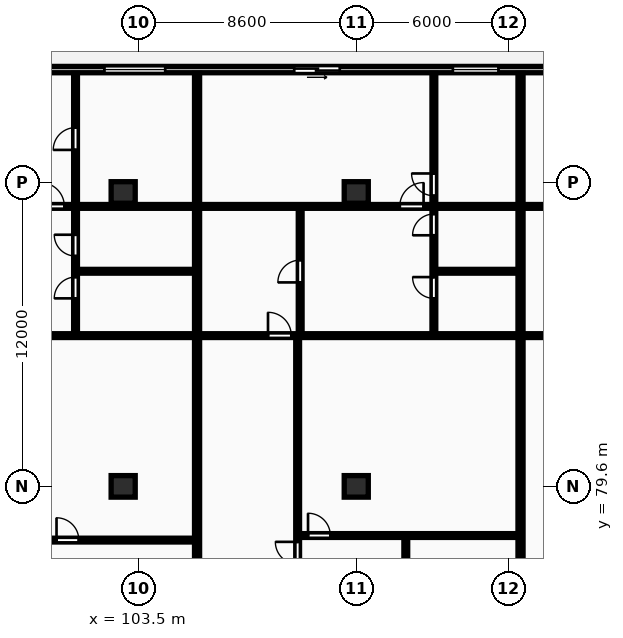
"""IFC4 building model, lengths in metres.
Left out: names, types, materials, properties, quantities, classifications, styles, units other than length and angle.
Written with IfcOpenShell. Run it as: python <this file> out.ifc"""

import sys

from ifc_helpers import new_model, si_unit, direction, frame, frame_2d, origin, origin_2d, place, context, subcontext, project, spatial, rectangle, extrude, element, fill, save


model = new_model("IFC4")
c1 = context("Model", 3, precision=1e-05, world=origin(), true_north=direction((0.0, 1.0)))
c2 = subcontext(c1, "Body", "Model", "MODEL_VIEW")
j1 = project(units=[si_unit("LENGTHUNIT", "METRE"), si_unit("PLANEANGLEUNIT", "RADIAN")], contexts=[c1])
p1 = place(None, origin())
s1 = spatial("IfcSite", under=j1, at=p1, CompositionType="ELEMENT")
p2 = place(p1, origin())
s2 = spatial("IfcBuilding", under=s1, at=p2, CompositionType="ELEMENT")
p3 = place(p2, frame((0.0, 0.0, 106.8)))
s3 = spatial("IfcBuildingStorey", under=s2, at=p3, CompositionType="ELEMENT", Elevation=106.8)
for number, where, z_axis, x_axis in (
    (1, (102.9, 79.6, 0.0), (0.0, 0.0, 1.0), (1.0, 0.0, 0.0)),
    (2, (102.9, 91.2, 0.0), (0.0, 0.0, 1.0), (1.0, 0.0, 0.0)),
    (3, (112.1, 79.6, 0.0), (0.0, 0.0, 1.0), (1.0, 0.0, 0.0)),
    (4, (112.1, 91.2, 0.0), (0.0, 0.0, 1.0), (1.0, 0.0, 0.0)),
):
    element("IfcColumn", number, at=place(p3, frame(where, z_axis=z_axis, x_axis=x_axis)), inside=s3, PredefinedType="COLUMN", context=c2, shape_type="SweptSolid", body=[
        extrude(rectangle(XDim=0.95, YDim=0.85, at=origin_2d()), origin(), (0.0, 0.0, 1.0), 3.25),
    ])
p4 = place(p3, frame((130.6, 96.05, 0.0), z_axis=(0.0, 0.0, 1.0), x_axis=(-1.0, 0.0, 0.0)))
e5 = element("IfcWall", 5, at=p4, inside=s3, PredefinedType="STANDARD", context=c2, shape_type="SweptSolid", body=[
    extrude(rectangle(XDim=73.0, YDim=0.25, at=frame_2d((36.5, 0.0))), origin(), (0.0, 0.0, 1.0), 2.97),
])
p5 = place(p4, frame((68.319, 0.0, 0.0)))
e6 = element("IfcOpeningElement", 6, at=p5, cuts=e5, PredefinedType="OPENING", context=c2, shape_type="SweptSolid", body=[
    extrude(rectangle(XDim=1.8, YDim=2.2, at=frame_2d((0.9, 1.1))), frame((0.0, 0.135, 0.0), z_axis=(0.0, -1.0, 0.0), x_axis=(1.0, 0.0, 0.0)), (0.0, 0.0, 1.0), 0.27),
])
p6 = place(p4, frame((59.277, 0.0, 0.85)))
e7 = element("IfcOpeningElement", 7, at=p6, cuts=e5, PredefinedType="OPENING", context=c2, shape_type="SweptSolid", body=[
    extrude(rectangle(XDim=2.4, YDim=1.9, at=frame_2d((1.2, 0.95))), frame((0.0, 0.135, 0.0), z_axis=(0.0, -1.0, 0.0), x_axis=(1.0, 0.0, 0.0)), (0.0, 0.0, 1.0), 0.27),
])
p7 = place(p4, frame((50.199, 0.0, 0.0)))
e8 = element("IfcOpeningElement", 8, at=p7, cuts=e5, PredefinedType="OPENING", context=c2, shape_type="SweptSolid", body=[
    extrude(rectangle(XDim=1.8, YDim=2.2, at=frame_2d((0.9, 1.1))), frame((0.0, 0.135, 0.0), z_axis=(0.0, -1.0, 0.0), x_axis=(1.0, 0.0, 0.0)), (0.0, 0.0, 1.0), 0.27),
])
p8 = place(p4, frame((40.481, 0.0, 0.85)))
e9 = element("IfcOpeningElement", 9, at=p8, cuts=e5, PredefinedType="OPENING", context=c2, shape_type="SweptSolid", body=[
    extrude(rectangle(XDim=2.4, YDim=1.9, at=frame_2d((1.2, 0.95))), frame((0.0, 0.135, 0.0), z_axis=(0.0, -1.0, 0.0), x_axis=(1.0, 0.0, 0.0)), (0.0, 0.0, 1.0), 0.27),
])
p9 = place(p4, frame((31.93, 0.0, 0.0)))
e10 = element("IfcOpeningElement", 10, at=p9, cuts=e5, PredefinedType="OPENING", context=c2, shape_type="SweptSolid", body=[
    extrude(rectangle(XDim=1.8, YDim=2.2, at=frame_2d((0.9, 1.1))), frame((0.0, 0.135, 0.0), z_axis=(0.0, -1.0, 0.0), x_axis=(1.0, 0.0, 0.0)), (0.0, 0.0, 1.0), 0.27),
])
p10 = place(p4, frame((26.042, 0.0, 0.85)))
e11 = element("IfcOpeningElement", 11, at=p10, cuts=e5, PredefinedType="OPENING", context=c2, shape_type="SweptSolid", body=[
    extrude(rectangle(XDim=2.4, YDim=1.9, at=frame_2d((1.2, 0.95))), frame((0.0, 0.135, 0.0), z_axis=(0.0, -1.0, 0.0), x_axis=(1.0, 0.0, 0.0)), (0.0, 0.0, 1.0), 0.27),
])
p11 = place(p4, frame((19.15, 0.0, 0.0)))
e12 = element("IfcOpeningElement", 12, at=p11, cuts=e5, PredefinedType="OPENING", context=c2, shape_type="SweptSolid", body=[
    extrude(rectangle(XDim=1.8, YDim=2.2, at=frame_2d((0.9, 1.1))), frame((0.0, 0.135, 0.0), z_axis=(0.0, -1.0, 0.0), x_axis=(1.0, 0.0, 0.0)), (0.0, 0.0, 1.0), 0.27),
])
p12 = place(p4, frame((12.886, 0.0, 0.85)))
e13 = element("IfcOpeningElement", 13, at=p12, cuts=e5, PredefinedType="OPENING", context=c2, shape_type="SweptSolid", body=[
    extrude(rectangle(XDim=1.8, YDim=1.8, at=frame_2d((0.9, 0.9))), frame((0.0, 0.135, 0.0), z_axis=(0.0, -1.0, 0.0), x_axis=(1.0, 0.0, 0.0)), (0.0, 0.0, 1.0), 0.27),
])
p13 = place(p4, frame((7.088, 0.0, 0.0)))
e14 = element("IfcOpeningElement", 14, at=p13, cuts=e5, PredefinedType="OPENING", context=c2, shape_type="SweptSolid", body=[
    extrude(rectangle(XDim=1.8, YDim=2.2, at=frame_2d((0.9, 1.1))), frame((0.0, 0.135, 0.0), z_axis=(0.0, -1.0, 0.0), x_axis=(1.0, 0.0, 0.0)), (0.0, 0.0, 1.0), 0.27),
])
p14 = place(p4, frame((0.9, 0.0, 0.85)))
e15 = element("IfcOpeningElement", 15, at=p14, cuts=e5, PredefinedType="OPENING", context=c2, shape_type="SweptSolid", body=[
    extrude(rectangle(XDim=2.4, YDim=1.9, at=frame_2d((1.2, 0.95))), frame((0.0, 0.135, 0.0), z_axis=(0.0, -1.0, 0.0), x_axis=(1.0, 0.0, 0.0)), (0.0, 0.0, 1.0), 0.27),
])
p15 = place(p3, frame((105.817, 69.83, 0.0), z_axis=(0.0, 0.0, 1.0), x_axis=(0.0, 1.0, 0.0)))
e16 = element("IfcWall", 16, at=p15, inside=s3, PredefinedType="PARTITIONING", context=c2, shape_type="SweptSolid", body=[
    extrude(rectangle(XDim=26.07, YDim=0.2, at=frame_2d((13.035, 0.0))), origin(), (0.0, 0.0, 1.0), 2.97),
])
p16 = place(p3, frame((98.431, 77.48, 0.0), z_axis=(0.0, 0.0, 1.0), x_axis=(1.0, 0.0, 0.0)))
e17 = element("IfcWall", 17, at=p16, inside=s3, PredefinedType="PARTITIONING", context=c2, shape_type="SweptSolid", body=[
    extrude(rectangle(XDim=7.306, YDim=0.15, at=frame_2d((3.653, 0.0))), origin(), (0.0, 0.0, 1.0), 2.97),
])
p17 = place(p16, frame((1.839, 0.0, 0.0)))
e18 = element("IfcOpeningElement", 18, at=p17, cuts=e17, PredefinedType="OPENING", context=c2, shape_type="SweptSolid", body=[
    extrude(rectangle(XDim=0.88, YDim=2.06, at=frame_2d((0.44, 1.03))), frame((0.0, 0.085, 0.0), z_axis=(0.0, -1.0, 0.0), x_axis=(1.0, 0.0, 0.0)), (0.0, 0.0, 1.0), 0.17),
])
p18 = place(p3, frame((101.08, 88.09, 0.0), z_axis=(0.0, 0.0, 1.0), x_axis=(1.0, 0.0, 0.0)))
e19 = element("IfcWall", 19, at=p18, inside=s3, PredefinedType="PARTITIONING", context=c2, shape_type="SweptSolid", body=[
    extrude(rectangle(XDim=4.656, YDim=0.15, at=frame_2d((2.328, 0.0))), origin(), (0.0, 0.0, 1.0), 2.97),
])
p19 = place(p3, frame((101.02, 85.59, 0.0), z_axis=(0.0, 0.0, 1.0), x_axis=(0.0, 1.0, 0.0)))
e20 = element("IfcWall", 20, at=p19, inside=s3, PredefinedType="PARTITIONING", context=c2, shape_type="SweptSolid", body=[
    extrude(rectangle(XDim=10.31, YDim=0.15, at=frame_2d((5.155, 0.0))), origin(), (0.0, 0.0, 1.0), 2.97),
])
p20 = place(p19, frame((1.43, 0.0, 0.0)))
e21 = element("IfcOpeningElement", 21, at=p20, cuts=e20, PredefinedType="OPENING", context=c2, shape_type="SweptSolid", body=[
    extrude(rectangle(XDim=0.84, YDim=2.04, at=frame_2d((0.42, 1.02))), frame((0.0, 0.085, 0.0), z_axis=(0.0, -1.0, 0.0), x_axis=(1.0, 0.0, 0.0)), (0.0, 0.0, 1.0), 0.17),
])
p21 = place(p19, frame((3.102, 0.0, 0.0)))
e22 = element("IfcOpeningElement", 22, at=p21, cuts=e20, PredefinedType="OPENING", context=c2, shape_type="SweptSolid", body=[
    extrude(rectangle(XDim=0.84, YDim=2.04, at=frame_2d((0.42, 1.02))), frame((0.0, 0.085, 0.0), z_axis=(0.0, -1.0, 0.0), x_axis=(1.0, 0.0, 0.0)), (0.0, 0.0, 1.0), 0.17),
])
p22 = place(p19, frame((7.29, 0.0, 0.0)))
e23 = element("IfcOpeningElement", 23, at=p22, cuts=e20, PredefinedType="OPENING", context=c2, shape_type="SweptSolid", body=[
    extrude(rectangle(XDim=0.88, YDim=2.06, at=frame_2d((0.44, 1.03))), frame((0.0, 0.085, 0.0), z_axis=(0.0, -1.0, 0.0), x_axis=(1.0, 0.0, 0.0)), (0.0, 0.0, 1.0), 0.17),
])
p23 = place(p3, frame((94.481, 85.55, 0.0), z_axis=(0.0, 0.0, 1.0), x_axis=(1.0, 0.0, 0.0)))
e24 = element("IfcWall", 24, at=p23, inside=s3, PredefinedType="PARTITIONING", context=c2, shape_type="SweptSolid", body=[
    extrude(rectangle(XDim=11.256, YDim=0.15, at=frame_2d((5.628, 0.0))), origin(), (0.0, 0.0, 1.0), 2.97),
])
p24 = place(p23, frame((2.72, 0.0, 0.0)))
e25 = element("IfcOpeningElement", 25, at=p24, cuts=e24, PredefinedType="OPENING", context=c2, shape_type="SweptSolid", body=[
    extrude(rectangle(XDim=0.92, YDim=2.08, at=frame_2d((0.46, 1.04))), frame((0.0, 0.085, 0.0), z_axis=(0.0, -1.0, 0.0), x_axis=(1.0, 0.0, 0.0)), (0.0, 0.0, 1.0), 0.17),
])
p25 = place(p3, frame((94.481, 90.65, 0.0), z_axis=(0.0, 0.0, 1.0), x_axis=(1.0, 0.0, 0.0)))
e26 = element("IfcWall", 26, at=p25, inside=s3, PredefinedType="PARTITIONING", context=c2, shape_type="SweptSolid", body=[
    extrude(rectangle(XDim=11.256, YDim=0.15, at=frame_2d((5.628, 0.0))), origin(), (0.0, 0.0, 1.0), 2.97),
])
p26 = place(p25, frame((5.158, 0.0, 0.0)))
e27 = element("IfcOpeningElement", 27, at=p26, cuts=e26, PredefinedType="OPENING", context=c2, shape_type="SweptSolid", body=[
    extrude(rectangle(XDim=0.94, YDim=2.1, at=frame_2d((0.47, 1.05))), frame((0.0, 0.085, 0.0), z_axis=(0.0, -1.0, 0.0), x_axis=(1.0, 0.0, 0.0)), (0.0, 0.0, 1.0), 0.17),
])
p27 = place(p3, frame((118.584, 69.83, 0.0), z_axis=(0.0, 0.0, 1.0), x_axis=(0.0, 1.0, 0.0)))
e28 = element("IfcWall", 28, at=p27, inside=s3, PredefinedType="PARTITIONING", context=c2, shape_type="SweptSolid", body=[
    extrude(rectangle(XDim=26.07, YDim=0.2, at=frame_2d((13.035, 0.0))), origin(), (0.0, 0.0, 1.0), 2.97),
])
p28 = place(p3, frame((114.055, 69.81, 0.0), z_axis=(0.0, 0.0, 1.0), x_axis=(0.0, 1.0, 0.0)))
e29 = element("IfcWall", 29, at=p28, inside=s3, PredefinedType="PARTITIONING", context=c2, shape_type="SweptSolid", body=[
    extrude(rectangle(XDim=7.85, YDim=0.15, at=frame_2d((3.925, 0.0))), origin(), (0.0, 0.0, 1.0), 2.97),
])
p29 = place(p28, frame((3.505, 0.0, 0.0)))
e30 = element("IfcOpeningElement", 30, at=p29, cuts=e29, PredefinedType="OPENING", context=c2, shape_type="SweptSolid", body=[
    extrude(rectangle(XDim=0.84, YDim=2.04, at=frame_2d((0.42, 1.02))), frame((0.0, 0.085, 0.0), z_axis=(0.0, -1.0, 0.0), x_axis=(1.0, 0.0, 0.0)), (0.0, 0.0, 1.0), 0.17),
])
p30 = place(p3, frame((109.847, 77.66, 0.0), z_axis=(0.0, 0.0, 1.0), x_axis=(1.0, 0.0, 0.0)))
e31 = element("IfcWall", 31, at=p30, inside=s3, PredefinedType="PARTITIONING", context=c2, shape_type="SweptSolid", body=[
    extrude(rectangle(XDim=8.657, YDim=0.15, at=frame_2d((4.329, 0.0))), origin(), (0.0, 0.0, 1.0), 2.97),
])
p31 = place(p30, frame((0.35, 0.0, 0.0)))
e32 = element("IfcOpeningElement", 32, at=p31, cuts=e31, PredefinedType="OPENING", context=c2, shape_type="SweptSolid", body=[
    extrude(rectangle(XDim=0.88, YDim=2.06, at=frame_2d((0.44, 1.03))), frame((0.0, 0.085, 0.0), z_axis=(0.0, -1.0, 0.0), x_axis=(1.0, 0.0, 0.0)), (0.0, 0.0, 1.0), 0.17),
])
p32 = place(p3, frame((109.787, 69.81, 0.0), z_axis=(0.0, 0.0, 1.0), x_axis=(0.0, 1.0, 0.0)))
e33 = element("IfcWall", 33, at=p32, inside=s3, PredefinedType="PARTITIONING", context=c2, shape_type="SweptSolid", body=[
    extrude(rectangle(XDim=15.7, YDim=0.15, at=frame_2d((7.85, 0.0))), origin(), (0.0, 0.0, 1.0), 2.97),
])
p33 = place(p32, frame((6.72, 0.0, 0.0)))
e34 = element("IfcOpeningElement", 34, at=p33, cuts=e33, PredefinedType="OPENING", context=c2, shape_type="SweptSolid", body=[
    extrude(rectangle(XDim=0.88, YDim=2.06, at=frame_2d((0.44, 1.03))), frame((0.0, 0.085, 0.0), z_axis=(0.0, -1.0, 0.0), x_axis=(1.0, 0.0, 0.0)), (0.0, 0.0, 1.0), 0.17),
])
p34 = place(p3, frame((109.887, 85.59, 0.0), z_axis=(0.0, 0.0, 1.0), x_axis=(0.0, 1.0, 0.0)))
e35 = element("IfcWall", 35, at=p34, inside=s3, PredefinedType="PARTITIONING", context=c2, shape_type="SweptSolid", body=[
    extrude(rectangle(XDim=5.0, YDim=0.15, at=frame_2d((2.5, 0.0))), origin(), (0.0, 0.0, 1.0), 2.97),
])
p35 = place(p34, frame((2.06, 0.0, 0.0)))
e36 = element("IfcOpeningElement", 36, at=p35, cuts=e35, PredefinedType="OPENING", context=c2, shape_type="SweptSolid", body=[
    extrude(rectangle(XDim=0.88, YDim=2.06, at=frame_2d((0.44, 1.03))), frame((0.0, 0.085, 0.0), z_axis=(0.0, -1.0, 0.0), x_axis=(1.0, 0.0, 0.0)), (0.0, 0.0, 1.0), 0.17),
])
p36 = place(p3, frame((115.224, 88.09, 0.0), z_axis=(0.0, 0.0, 1.0), x_axis=(1.0, 0.0, 0.0)))
e37 = element("IfcWall", 37, at=p36, inside=s3, PredefinedType="PARTITIONING", context=c2, shape_type="SweptSolid", body=[
    extrude(rectangle(XDim=3.28, YDim=0.15, at=frame_2d((1.64, 0.0))), origin(), (0.0, 0.0, 1.0), 2.97),
])
p37 = place(p3, frame((115.164, 85.59, 0.0), z_axis=(0.0, 0.0, 1.0), x_axis=(0.0, 1.0, 0.0)))
e38 = element("IfcWall", 38, at=p37, inside=s3, PredefinedType="PARTITIONING", context=c2, shape_type="SweptSolid", body=[
    extrude(rectangle(XDim=10.31, YDim=0.15, at=frame_2d((5.155, 0.0))), origin(), (0.0, 0.0, 1.0), 2.97),
])
p38 = place(p37, frame((1.43, 0.0, 0.0)))
e39 = element("IfcOpeningElement", 39, at=p38, cuts=e38, PredefinedType="OPENING", context=c2, shape_type="SweptSolid", body=[
    extrude(rectangle(XDim=0.84, YDim=2.04, at=frame_2d((0.42, 1.02))), frame((0.0, 0.085, 0.0), z_axis=(0.0, -1.0, 0.0), x_axis=(1.0, 0.0, 0.0)), (0.0, 0.0, 1.0), 0.17),
])
p39 = place(p37, frame((3.92, 0.0, 0.0)))
e40 = element("IfcOpeningElement", 40, at=p39, cuts=e38, PredefinedType="OPENING", context=c2, shape_type="SweptSolid", body=[
    extrude(rectangle(XDim=0.84, YDim=2.04, at=frame_2d((0.42, 1.02))), frame((0.0, 0.085, 0.0), z_axis=(0.0, -1.0, 0.0), x_axis=(1.0, 0.0, 0.0)), (0.0, 0.0, 1.0), 0.17),
])
p40 = place(p37, frame((5.48, 0.0, 0.0)))
e41 = element("IfcOpeningElement", 41, at=p40, cuts=e38, PredefinedType="OPENING", context=c2, shape_type="SweptSolid", body=[
    extrude(rectangle(XDim=0.88, YDim=2.06, at=frame_2d((0.44, 1.03))), frame((0.0, 0.085, 0.0), z_axis=(0.0, -1.0, 0.0), x_axis=(1.0, 0.0, 0.0)), (0.0, 0.0, 1.0), 0.17),
])
p41 = place(p3, frame((105.896, 85.55, 0.0), z_axis=(0.0, 0.0, 1.0), x_axis=(1.0, 0.0, 0.0)))
e42 = element("IfcWall", 42, at=p41, inside=s3, PredefinedType="PARTITIONING", context=c2, shape_type="SweptSolid", body=[
    extrude(rectangle(XDim=12.607, YDim=0.15, at=frame_2d((6.304, 0.0))), origin(), (0.0, 0.0, 1.0), 2.97),
])
p42 = place(p41, frame((2.72, 0.0, 0.0)))
e43 = element("IfcOpeningElement", 43, at=p42, cuts=e42, PredefinedType="OPENING", context=c2, shape_type="SweptSolid", body=[
    extrude(rectangle(XDim=0.92, YDim=2.08, at=frame_2d((0.46, 1.04))), frame((0.0, 0.085, 0.0), z_axis=(0.0, -1.0, 0.0), x_axis=(1.0, 0.0, 0.0)), (0.0, 0.0, 1.0), 0.17),
])
p43 = place(p3, frame((105.896, 90.65, 0.0), z_axis=(0.0, 0.0, 1.0), x_axis=(1.0, 0.0, 0.0)))
e44 = element("IfcWall", 44, at=p43, inside=s3, PredefinedType="PARTITIONING", context=c2, shape_type="SweptSolid", body=[
    extrude(rectangle(XDim=12.607, YDim=0.15, at=frame_2d((6.304, 0.0))), origin(), (0.0, 0.0, 1.0), 2.97),
])
p44 = place(p43, frame((7.921, 0.0, 0.0)))
e45 = element("IfcOpeningElement", 45, at=p44, cuts=e44, PredefinedType="OPENING", context=c2, shape_type="SweptSolid", body=[
    extrude(rectangle(XDim=0.94, YDim=2.1, at=frame_2d((0.47, 1.05))), frame((0.0, 0.085, 0.0), z_axis=(0.0, -1.0, 0.0), x_axis=(1.0, 0.0, 0.0)), (0.0, 0.0, 1.0), 0.17),
])
p45 = place(p3, frame((118.664, 85.55, 0.0), z_axis=(0.0, 0.0, 1.0), x_axis=(1.0, 0.0, 0.0)))
e46 = element("IfcWall", 46, at=p45, inside=s3, PredefinedType="PARTITIONING", context=c2, shape_type="SweptSolid", body=[
    extrude(rectangle(XDim=11.856, YDim=0.15, at=frame_2d((5.928, 0.0))), origin(), (0.0, 0.0, 1.0), 2.97),
])
p46 = place(p45, frame((2.72, 0.0, 0.0)))
e47 = element("IfcOpeningElement", 47, at=p46, cuts=e46, PredefinedType="OPENING", context=c2, shape_type="SweptSolid", body=[
    extrude(rectangle(XDim=0.92, YDim=2.08, at=frame_2d((0.46, 1.04))), frame((0.0, 0.085, 0.0), z_axis=(0.0, -1.0, 0.0), x_axis=(1.0, 0.0, 0.0)), (0.0, 0.0, 1.0), 0.17),
])
p47 = place(p3, frame((118.664, 90.65, 0.0), z_axis=(0.0, 0.0, 1.0), x_axis=(1.0, 0.0, 0.0)))
e48 = element("IfcWall", 48, at=p47, inside=s3, PredefinedType="PARTITIONING", context=c2, shape_type="SweptSolid", body=[
    extrude(rectangle(XDim=11.856, YDim=0.15, at=frame_2d((5.928, 0.0))), origin(), (0.0, 0.0, 1.0), 2.97),
])
p48 = place(p47, frame((5.458, 0.0, 0.0)))
e49 = element("IfcOpeningElement", 49, at=p48, cuts=e48, PredefinedType="OPENING", context=c2, shape_type="SweptSolid", body=[
    extrude(rectangle(XDim=0.94, YDim=2.1, at=frame_2d((0.47, 1.05))), frame((0.0, 0.085, 0.0), z_axis=(0.0, -1.0, 0.0), x_axis=(1.0, 0.0, 0.0)), (0.0, 0.0, 1.0), 0.17),
])
p49 = place(p10, origin())
e50 = element("IfcWindow", 50, at=p49, inside=s3, PartitioningType="DOUBLE_PANEL_VERTICAL", PredefinedType="WINDOW", context=c2, shape_type="SweptSolid", body=[
    extrude(rectangle(XDim=2.4, YDim=1.9, at=frame_2d((1.2, 0.95))), frame((0.0, 0.03, 0.0), z_axis=(0.0, -1.0, 0.0), x_axis=(1.0, 0.0, 0.0)), (0.0, 0.0, 1.0), 0.06),
])
fill(e11, e50)
p50 = place(p11, origin())
e51 = element("IfcDoor", 51, at=p50, inside=s3, OperationType="SLIDING_TO_LEFT", PredefinedType="DOOR", context=c2, shape_type="SweptSolid", body=[
    extrude(rectangle(XDim=1.8, YDim=2.2, at=frame_2d((0.9, 1.1))), frame((0.0, 0.025, 0.0), z_axis=(0.0, -1.0, 0.0), x_axis=(1.0, 0.0, 0.0)), (0.0, 0.0, 1.0), 0.05),
])
fill(e12, e51)
p51 = place(p12, origin())
e52 = element("IfcWindow", 52, at=p51, inside=s3, PartitioningType="SINGLE_PANEL", PredefinedType="WINDOW", context=c2, shape_type="SweptSolid", body=[
    extrude(rectangle(XDim=1.8, YDim=1.8, at=frame_2d((0.9, 0.9))), frame((0.0, 0.03, 0.0), z_axis=(0.0, -1.0, 0.0), x_axis=(1.0, 0.0, 0.0)), (0.0, 0.0, 1.0), 0.06),
])
fill(e13, e52)
p52 = place(p17, origin())
e53 = element("IfcDoor", 53, at=p52, inside=s3, OperationType="SINGLE_SWING_LEFT", PredefinedType="DOOR", context=c2, shape_type="SweptSolid", body=[
    extrude(rectangle(XDim=0.88, YDim=2.06, at=frame_2d((0.44, 1.03))), frame((0.0, 0.025, 0.0), z_axis=(0.0, -1.0, 0.0), x_axis=(1.0, 0.0, 0.0)), (0.0, 0.0, 1.0), 0.05),
])
fill(e18, e53)
p53 = place(p20, origin())
e54 = element("IfcDoor", 54, at=p53, inside=s3, OperationType="SINGLE_SWING_LEFT", PredefinedType="DOOR", context=c2, shape_type="SweptSolid", body=[
    extrude(rectangle(XDim=0.84, YDim=2.04, at=frame_2d((0.42, 1.02))), frame((0.0, 0.025, 0.0), z_axis=(0.0, -1.0, 0.0), x_axis=(1.0, 0.0, 0.0)), (0.0, 0.0, 1.0), 0.05),
])
fill(e21, e54)
p54 = place(p21, origin())
e55 = element("IfcDoor", 55, at=p54, inside=s3, OperationType="SINGLE_SWING_RIGHT", PredefinedType="DOOR", context=c2, shape_type="SweptSolid", body=[
    extrude(rectangle(XDim=0.84, YDim=2.04, at=frame_2d((0.42, 1.02))), frame((0.0, 0.025, 0.0), z_axis=(0.0, -1.0, 0.0), x_axis=(1.0, 0.0, 0.0)), (0.0, 0.0, 1.0), 0.05),
])
fill(e22, e55)
p55 = place(p22, origin())
e56 = element("IfcDoor", 56, at=p55, inside=s3, OperationType="SINGLE_SWING_LEFT", PredefinedType="DOOR", context=c2, shape_type="SweptSolid", body=[
    extrude(rectangle(XDim=0.88, YDim=2.06, at=frame_2d((0.44, 1.03))), frame((0.0, 0.025, 0.0), z_axis=(0.0, -1.0, 0.0), x_axis=(1.0, 0.0, 0.0)), (0.0, 0.0, 1.0), 0.05),
])
fill(e23, e56)
p56 = place(p26, origin())
e57 = element("IfcDoor", 57, at=p56, inside=s3, OperationType="SINGLE_SWING_LEFT", PredefinedType="DOOR", context=c2, shape_type="SweptSolid", body=[
    extrude(rectangle(XDim=0.94, YDim=2.1, at=frame_2d((0.47, 1.05))), frame((0.0, 0.025, 0.0), z_axis=(0.0, -1.0, 0.0), x_axis=(1.0, 0.0, 0.0)), (0.0, 0.0, 1.0), 0.05),
])
fill(e27, e57)
p57 = place(p31, origin())
e58 = element("IfcDoor", 58, at=p57, inside=s3, OperationType="SINGLE_SWING_LEFT", PredefinedType="DOOR", context=c2, shape_type="SweptSolid", body=[
    extrude(rectangle(XDim=0.88, YDim=2.06, at=frame_2d((0.44, 1.03))), frame((0.0, 0.025, 0.0), z_axis=(0.0, -1.0, 0.0), x_axis=(1.0, 0.0, 0.0)), (0.0, 0.0, 1.0), 0.05),
])
fill(e32, e58)
p58 = place(p33, origin())
e59 = element("IfcDoor", 59, at=p58, inside=s3, OperationType="SINGLE_SWING_RIGHT", PredefinedType="DOOR", context=c2, shape_type="SweptSolid", body=[
    extrude(rectangle(XDim=0.88, YDim=2.06, at=frame_2d((0.44, 1.03))), frame((0.0, 0.025, 0.0), z_axis=(0.0, -1.0, 0.0), x_axis=(1.0, 0.0, 0.0)), (0.0, 0.0, 1.0), 0.05),
])
fill(e34, e59)
p59 = place(p35, origin())
e60 = element("IfcDoor", 60, at=p59, inside=s3, OperationType="SINGLE_SWING_LEFT", PredefinedType="DOOR", context=c2, shape_type="SweptSolid", body=[
    extrude(rectangle(XDim=0.88, YDim=2.06, at=frame_2d((0.44, 1.03))), frame((0.0, 0.025, 0.0), z_axis=(0.0, -1.0, 0.0), x_axis=(1.0, 0.0, 0.0)), (0.0, 0.0, 1.0), 0.05),
])
fill(e36, e60)
p60 = place(p38, origin())
e61 = element("IfcDoor", 61, at=p60, inside=s3, OperationType="SINGLE_SWING_RIGHT", PredefinedType="DOOR", context=c2, shape_type="SweptSolid", body=[
    extrude(rectangle(XDim=0.84, YDim=2.04, at=frame_2d((0.42, 1.02))), frame((0.0, 0.025, 0.0), z_axis=(0.0, -1.0, 0.0), x_axis=(1.0, 0.0, 0.0)), (0.0, 0.0, 1.0), 0.05),
])
fill(e39, e61)
p61 = place(p39, origin())
e62 = element("IfcDoor", 62, at=p61, inside=s3, OperationType="SINGLE_SWING_LEFT", PredefinedType="DOOR", context=c2, shape_type="SweptSolid", body=[
    extrude(rectangle(XDim=0.84, YDim=2.04, at=frame_2d((0.42, 1.02))), frame((0.0, 0.025, 0.0), z_axis=(0.0, -1.0, 0.0), x_axis=(1.0, 0.0, 0.0)), (0.0, 0.0, 1.0), 0.05),
])
fill(e40, e62)
p62 = place(p40, origin())
e63 = element("IfcDoor", 63, at=p62, inside=s3, OperationType="SINGLE_SWING_RIGHT", PredefinedType="DOOR", context=c2, shape_type="SweptSolid", body=[
    extrude(rectangle(XDim=0.88, YDim=2.06, at=frame_2d((0.44, 1.03))), frame((0.0, 0.025, 0.0), z_axis=(0.0, -1.0, 0.0), x_axis=(1.0, 0.0, 0.0)), (0.0, 0.0, 1.0), 0.05),
])
fill(e41, e63)
p63 = place(p42, origin())
e64 = element("IfcDoor", 64, at=p63, inside=s3, OperationType="SINGLE_SWING_LEFT", PredefinedType="DOOR", context=c2, shape_type="SweptSolid", body=[
    extrude(rectangle(XDim=0.92, YDim=2.08, at=frame_2d((0.46, 1.04))), frame((0.0, 0.025, 0.0), z_axis=(0.0, -1.0, 0.0), x_axis=(1.0, 0.0, 0.0)), (0.0, 0.0, 1.0), 0.05),
])
fill(e43, e64)
p64 = place(p44, origin())
e65 = element("IfcDoor", 65, at=p64, inside=s3, OperationType="SINGLE_SWING_RIGHT", PredefinedType="DOOR", context=c2, shape_type="SweptSolid", body=[
    extrude(rectangle(XDim=0.94, YDim=2.1, at=frame_2d((0.47, 1.05))), frame((0.0, 0.025, 0.0), z_axis=(0.0, -1.0, 0.0), x_axis=(1.0, 0.0, 0.0)), (0.0, 0.0, 1.0), 0.05),
])
fill(e45, e65)
save(model, sys.argv[1])
